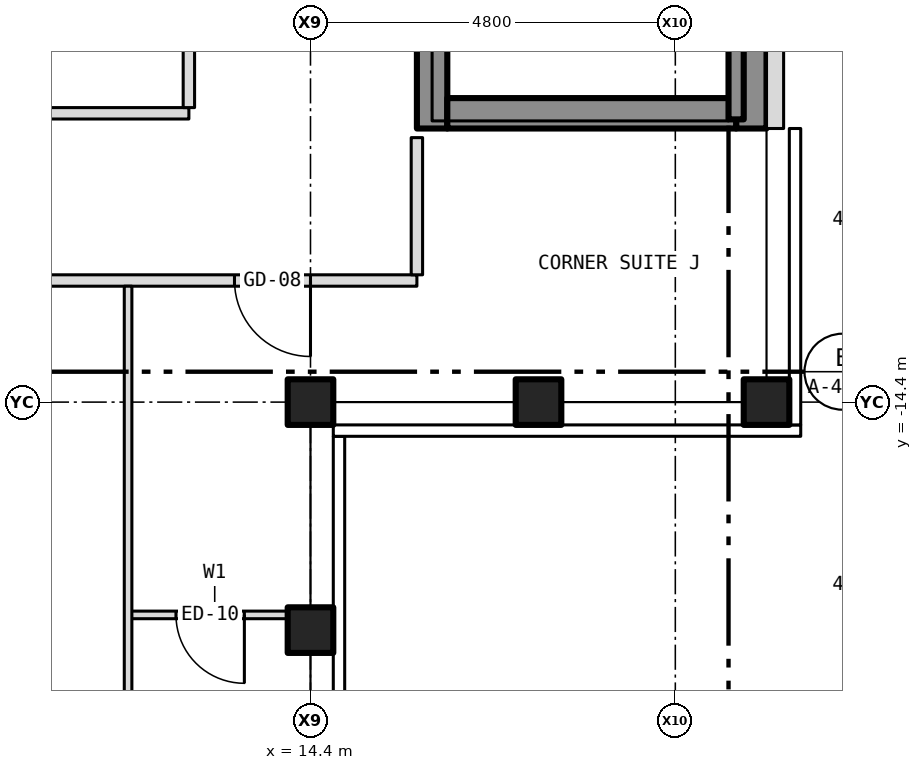
"""IFC4 building model, lengths in metres.
Left out: names, types, materials, properties, quantities, classifications, styles, units other than length and angle.
Written with IfcOpenShell. Run it as: python <this file> out.ifc"""

import sys

from ifc_helpers import new_model, si_unit, direction, frame, frame_2d, origin, origin_2d, place, context, subcontext, project, spatial, rectangle, hollow_rectangle, extrude, element, fill, save


model = new_model("IFC4")
c1 = context("Model", 3, precision=1e-05, world=origin(), true_north=direction((0.0, 1.0)))
c2 = subcontext(c1, "Body", "Model", "MODEL_VIEW")
j1 = project(units=[si_unit("LENGTHUNIT", "METRE"), si_unit("PLANEANGLEUNIT", "RADIAN")], contexts=[c1])
p1 = place(None, origin())
s1 = spatial("IfcSite", under=j1, at=p1, CompositionType="ELEMENT")
p2 = place(p1, origin())
s2 = spatial("IfcBuilding", under=s1, at=p2, CompositionType="ELEMENT")
p3 = place(p2, frame((0.0, 0.0, 262.0)))
s3 = spatial("IfcBuildingStorey", under=s2, at=p3, CompositionType="ELEMENT", Elevation=262.0)
for number, where, z_axis, x_axis in (
    (1, (20.4, -14.4, -0.15), (0.0, 0.0, 1.0), (1.0, 0.0, 0.0)),
    (2, (14.4, -14.4, -0.15), (0.0, 0.0, 1.0), (1.0, 0.0, 0.0)),
    (3, (14.4, -17.4, -0.15), (0.0, 0.0, 1.0), (1.0, 0.0, 0.0)),
    (4, (17.4, -14.4, -0.15), (0.0, 0.0, 1.0), (1.0, 0.0, 0.0)),
):
    element("IfcColumn", number, at=place(p3, frame(where, z_axis=z_axis, x_axis=x_axis)), inside=s3, PredefinedType="COLUMN", context=c2, shape_type="SweptSolid", body=[
        extrude(hollow_rectangle(XDim=0.6, YDim=0.6, WallThickness=0.03, at=origin_2d()), origin(), (0.0, 0.0, 1.0), 3.4),
    ])
p4 = place(p3, frame((16.0, -10.8, 0.0), z_axis=(0.0, 0.0, 1.0), x_axis=(0.0, 1.0, 0.0)))
e5 = element("IfcWall", 5, at=p4, inside=s3, PredefinedType="SHEAR", context=c2, shape_type="SweptSolid", body=[
    extrude(rectangle(XDim=21.6, YDim=0.4, at=frame_2d((10.8, 0.0))), origin(), (0.0, 0.0, 1.0), 3.25),
])
p5 = place(p4, frame((9.4, 0.0, 0.0)))
e6 = element("IfcOpeningElement", 6, at=p5, cuts=e5, PredefinedType="OPENING", context=c2, shape_type="SweptSolid", body=[
    extrude(rectangle(XDim=1.1, YDim=2.1, at=frame_2d((0.55, 1.05))), frame((0.0, 0.212, 0.0), z_axis=(0.0, -1.0, 0.0), x_axis=(1.0, 0.0, 0.0)), (0.0, 0.0, 1.0), 0.424),
])
p6 = place(p4, frame((11.5, 0.0, 0.0)))
e7 = element("IfcOpeningElement", 7, at=p6, cuts=e5, PredefinedType="OPENING", context=c2, shape_type="SweptSolid", body=[
    extrude(rectangle(XDim=1.1, YDim=2.1, at=frame_2d((0.55, 1.05))), frame((0.0, 0.212, 0.0), z_axis=(0.0, -1.0, 0.0), x_axis=(1.0, 0.0, 0.0)), (0.0, 0.0, 1.0), 0.424),
])
p7 = place(p4, frame((13.6, 0.0, 0.0)))
e8 = element("IfcOpeningElement", 8, at=p7, cuts=e5, PredefinedType="OPENING", context=c2, shape_type="SweptSolid", body=[
    extrude(rectangle(XDim=1.1, YDim=2.1, at=frame_2d((0.55, 1.05))), frame((0.0, 0.212, 0.0), z_axis=(0.0, -1.0, 0.0), x_axis=(1.0, 0.0, 0.0)), (0.0, 0.0, 1.0), 0.424),
])
p8 = place(p4, frame((15.7, 0.0, 0.0)))
e9 = element("IfcOpeningElement", 9, at=p8, cuts=e5, PredefinedType="OPENING", context=c2, shape_type="SweptSolid", body=[
    extrude(rectangle(XDim=1.1, YDim=2.1, at=frame_2d((0.55, 1.05))), frame((0.0, 0.212, 0.0), z_axis=(0.0, -1.0, 0.0), x_axis=(1.0, 0.0, 0.0)), (0.0, 0.0, 1.0), 0.424),
])
p9 = place(p4, frame((17.8, 0.0, 0.0)))
e10 = element("IfcOpeningElement", 10, at=p9, cuts=e5, PredefinedType="OPENING", context=c2, shape_type="SweptSolid", body=[
    extrude(rectangle(XDim=1.1, YDim=2.1, at=frame_2d((0.55, 1.05))), frame((0.0, 0.212, 0.0), z_axis=(0.0, -1.0, 0.0), x_axis=(1.0, 0.0, 0.0)), (0.0, 0.0, 1.0), 0.424),
])
p10 = place(p4, frame((5.642, 0.0, 0.0)))
e11 = element("IfcOpeningElement", 11, at=p10, cuts=e5, PredefinedType="OPENING", context=c2, shape_type="SweptSolid", body=[
    extrude(rectangle(XDim=1.1, YDim=2.1, at=frame_2d((0.55, 1.05))), frame((0.0, 0.212, 0.0), z_axis=(0.0, -1.0, 0.0), x_axis=(1.0, 0.0, 0.0)), (0.0, 0.0, 1.0), 0.424),
])
p11 = place(p4, frame((7.5, 0.0, 0.0)))
e12 = element("IfcOpeningElement", 12, at=p11, cuts=e5, PredefinedType="OPENING", context=c2, shape_type="SweptSolid", body=[
    extrude(rectangle(XDim=1.1, YDim=2.1, at=frame_2d((0.55, 1.05))), frame((0.0, 0.212, 0.0), z_axis=(0.0, -1.0, 0.0), x_axis=(1.0, 0.0, 0.0)), (0.0, 0.0, 1.0), 0.424),
])
p12 = place(p4, frame((20.0, 0.0, 0.0)))
e13 = element("IfcOpeningElement", 13, at=p12, cuts=e5, PredefinedType="OPENING", context=c2, shape_type="SweptSolid", body=[
    extrude(rectangle(XDim=0.9, YDim=2.1, at=frame_2d((0.45, 1.05))), frame((0.0, 0.212, 0.0), z_axis=(0.0, -1.0, 0.0), x_axis=(1.0, 0.0, 0.0)), (0.0, 0.0, 1.0), 0.424),
])
p13 = place(p3, frame((20.2, -10.8, 0.0), z_axis=(0.0, 0.0, 1.0), x_axis=(0.0, 1.0, 0.0)))
e14 = element("IfcWall", 14, at=p13, inside=s3, PredefinedType="SHEAR", context=c2, shape_type="SweptSolid", body=[
    extrude(rectangle(XDim=21.6, YDim=0.4, at=frame_2d((10.8, 0.0))), origin(), (0.0, 0.0, 1.0), 3.25),
])
p14 = place(p3, frame((16.2, -10.6, 0.0), z_axis=(0.0, 0.0, 1.0), x_axis=(1.0, 0.0, 0.0)))
e15 = element("IfcWall", 15, at=p14, inside=s3, PredefinedType="SHEAR", context=c2, shape_type="SweptSolid", body=[
    extrude(rectangle(XDim=3.8, YDim=0.4, at=frame_2d((1.9, 0.0))), origin(), (0.0, 0.0, 1.0), 3.25),
])
p15 = place(p3, frame((20.512, -10.8, 0.0), z_axis=(0.0, 0.0, 1.0), x_axis=(0.0, 1.0, 0.0)))
e16 = element("IfcWall", 16, at=p15, inside=s3, PredefinedType="SOLIDWALL", context=c2, shape_type="SweptSolid", body=[
    extrude(rectangle(XDim=21.6, YDim=0.225, at=frame_2d((10.8, 0.0))), origin(), (0.0, 0.0, 1.0), 3.5),
])
p16 = place(p15, frame((2.95, 0.0, 1.0)))
e17 = element("IfcOpeningElement", 17, at=p16, cuts=e16, PredefinedType="OPENING", context=c2, shape_type="SweptSolid", body=[
    extrude(rectangle(XDim=0.6, YDim=1.5, at=frame_2d((0.3, 0.75))), frame((0.0, 0.125, 0.0), z_axis=(0.0, -1.0, 0.0), x_axis=(1.0, 0.0, 0.0)), (0.0, 0.0, 1.0), 0.249),
])
p17 = place(p3, frame((12.0, -17.2, 0.0), z_axis=(0.0, 0.0, 1.0), x_axis=(1.0, 0.0, 0.0)))
e18 = element("IfcWall", 18, at=p17, inside=s3, PredefinedType="PARTITIONING", context=c2, shape_type="SweptSolid", body=[
    extrude(rectangle(XDim=2.28, YDim=0.1, at=frame_2d((1.14, 0.0))), origin(), (0.0, 0.0, 1.0), 3.25),
])
p18 = place(p17, frame((0.63, 0.0, 0.0)))
e19 = element("IfcOpeningElement", 19, at=p18, cuts=e18, PredefinedType="OPENING", context=c2, shape_type="SweptSolid", body=[
    extrude(rectangle(XDim=0.9, YDim=2.1, at=frame_2d((0.45, 1.05))), frame((0.0, 0.062, 0.0), z_axis=(0.0, -1.0, 0.0), x_axis=(1.0, 0.0, 0.0)), (0.0, 0.0, 1.0), 0.124),
])
p19 = place(p3, frame((-15.8, -12.8, 0.0), z_axis=(0.0, 0.0, 1.0), x_axis=(1.0, 0.0, 0.0)))
e20 = element("IfcWall", 20, at=p19, inside=s3, PredefinedType="PARTITIONING", context=c2, shape_type="SweptSolid", body=[
    extrude(rectangle(XDim=31.6, YDim=0.15, at=frame_2d((15.8, 0.0))), origin(), (0.0, 0.0, 1.0), 3.25),
])
p20 = place(p19, frame((6.8, 0.0, 0.0)))
e21 = element("IfcOpeningElement", 21, at=p20, cuts=e20, PredefinedType="OPENING", context=c2, shape_type="SweptSolid", body=[
    extrude(rectangle(XDim=1.0, YDim=2.1, at=frame_2d((0.5, 1.05))), frame((0.0, 0.087, 0.0), z_axis=(0.0, -1.0, 0.0), x_axis=(1.0, 0.0, 0.0)), (0.0, 0.0, 1.0), 0.174),
])
p21 = place(p19, frame((15.35, 0.0, 0.0)))
e22 = element("IfcOpeningElement", 22, at=p21, cuts=e20, PredefinedType="OPENING", context=c2, shape_type="SweptSolid", body=[
    extrude(rectangle(XDim=0.9, YDim=2.1, at=frame_2d((0.45, 1.05))), frame((0.0, 0.087, 0.0), z_axis=(0.0, -1.0, 0.0), x_axis=(1.0, 0.0, 0.0)), (0.0, 0.0, 1.0), 0.174),
])
p22 = place(p19, frame((24.95, 0.0, 0.0)))
e23 = element("IfcOpeningElement", 23, at=p22, cuts=e20, PredefinedType="OPENING", context=c2, shape_type="SweptSolid", body=[
    extrude(rectangle(XDim=0.9, YDim=2.1, at=frame_2d((0.45, 1.05))), frame((0.0, 0.087, 0.0), z_axis=(0.0, -1.0, 0.0), x_axis=(1.0, 0.0, 0.0)), (0.0, 0.0, 1.0), 0.174),
])
p23 = place(p19, frame((1.4, 0.0, 0.0)))
e24 = element("IfcOpeningElement", 24, at=p23, cuts=e20, PredefinedType="OPENING", context=c2, shape_type="SweptSolid", body=[
    extrude(rectangle(XDim=1.0, YDim=2.1, at=frame_2d((0.5, 1.05))), frame((0.0, 0.087, 0.0), z_axis=(0.0, -1.0, 0.0), x_axis=(1.0, 0.0, 0.0)), (0.0, 0.0, 1.0), 0.174),
])
p24 = place(p19, frame((29.2, 0.0, 0.0)))
e25 = element("IfcOpeningElement", 25, at=p24, cuts=e20, PredefinedType="OPENING", context=c2, shape_type="SweptSolid", body=[
    extrude(rectangle(XDim=1.0, YDim=2.1, at=frame_2d((0.5, 1.05))), frame((0.0, 0.087, 0.0), z_axis=(0.0, -1.0, 0.0), x_axis=(1.0, 0.0, 0.0)), (0.0, 0.0, 1.0), 0.174),
])
p25 = place(p3, frame((8.1, -10.6, 0.0), z_axis=(0.0, 0.0, 1.0), x_axis=(1.0, 0.0, 0.0)))
e26 = element("IfcWall", 26, at=p25, inside=s3, PredefinedType="PARTITIONING", context=c2, shape_type="SweptSolid", body=[
    extrude(rectangle(XDim=4.7, YDim=0.15, at=frame_2d((2.35, 0.0))), origin(), (0.0, 0.0, 1.0), 3.25),
])
p26 = place(p3, frame((12.0, -20.73, 0.0), z_axis=(0.0, 0.0, 1.0), x_axis=(0.0, 1.0, 0.0)))
e27 = element("IfcWall", 27, at=p26, inside=s3, PredefinedType="PARTITIONING", context=c2, shape_type="SweptSolid", body=[
    extrude(rectangle(XDim=7.855, YDim=0.1, at=frame_2d((3.927, 0.0))), origin(), (0.0, 0.0, 1.0), 3.25),
])
p27 = place(p3, frame((12.8, -10.525, 0.0), z_axis=(0.0, 0.0, 1.0), x_axis=(0.0, 1.0, 0.0)))
e28 = element("IfcWall", 28, at=p27, inside=s3, PredefinedType="PARTITIONING", context=c2, shape_type="SweptSolid", body=[
    extrude(rectangle(XDim=8.525, YDim=0.15, at=frame_2d((4.262, 0.0))), origin(), (0.0, 0.0, 1.0), 3.25),
])
p28 = place(p3, frame((15.8, -12.725, 0.0), z_axis=(0.0, 0.0, 1.0), x_axis=(0.0, 1.0, 0.0)))
e29 = element("IfcWall", 29, at=p28, inside=s3, PredefinedType="PARTITIONING", context=c2, shape_type="SweptSolid", body=[
    extrude(rectangle(XDim=1.805, YDim=0.15, at=frame_2d((0.903, 0.0))), origin(), (0.0, 0.0, 1.0), 3.25),
])
p29 = place(p3, frame((20.0, -10.68, 0.0), z_axis=(0.0, 0.0, 1.0), x_axis=(0.0, 1.0, 0.0)))
e30 = element("IfcWall", 30, at=p29, inside=s3, PredefinedType="SHEAR", context=c2, shape_type="SweptSolid", body=[
    extrude(rectangle(XDim=6.98, YDim=0.2, at=frame_2d((3.49, 0.0))), origin(), (0.0, 0.0, 1.0), 3.25),
])
p30 = place(p18, origin())
e31 = element("IfcDoor", 31, at=p30, inside=s3, OperationType="SINGLE_SWING_RIGHT", PredefinedType="DOOR", context=c2, shape_type="SweptSolid", body=[
    extrude(rectangle(XDim=0.9, YDim=2.1, at=frame_2d((0.45, 1.05))), frame((0.0, 0.025, 0.0), z_axis=(0.0, -1.0, 0.0), x_axis=(1.0, 0.0, 0.0)), (0.0, 0.0, 1.0), 0.05),
])
fill(e19, e31)
p31 = place(p24, origin())
e32 = element("IfcDoor", 32, at=p31, inside=s3, OperationType="SINGLE_SWING_RIGHT", PredefinedType="DOOR", context=c2, shape_type="SweptSolid", body=[
    extrude(rectangle(XDim=1.0, YDim=2.1, at=frame_2d((0.5, 1.05))), frame((0.0, 0.025, 0.0), z_axis=(0.0, -1.0, 0.0), x_axis=(1.0, 0.0, 0.0)), (0.0, 0.0, 1.0), 0.05),
])
fill(e25, e32)
save(model, sys.argv[1])
